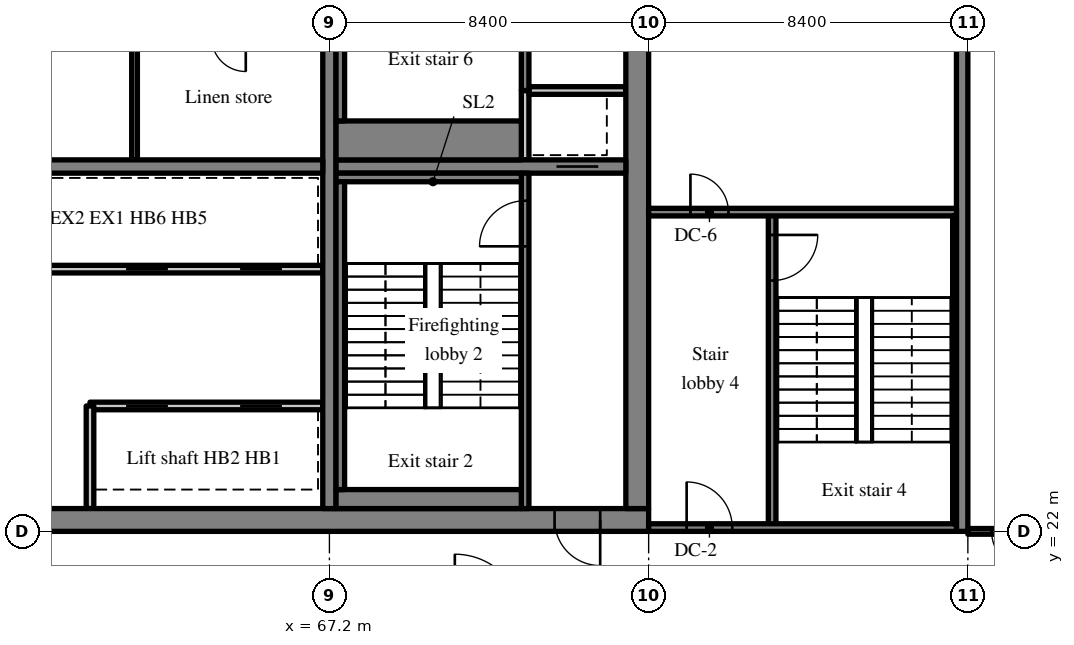
"""IFC4 building model, lengths in metres.
Left out: names, types, materials, properties, quantities, classifications, styles, units other than length and angle.
Written with IfcOpenShell. Run it as: python <this file> out.ifc"""

import sys

from ifc_helpers import new_model, si_unit, direction, frame, frame_2d, origin, place, context, subcontext, project, spatial, rectangle, extrude, source, transform, mapped, element, fill, save


model = new_model("IFC4")
c1 = context("Model", 3, precision=1e-05, world=origin(), true_north=direction((0.0, 1.0)))
c2 = subcontext(c1, "Body", "Model", "MODEL_VIEW")
j1 = project(units=[si_unit("LENGTHUNIT", "METRE"), si_unit("PLANEANGLEUNIT", "RADIAN")], contexts=[c1])
p1 = place(None, origin())
s1 = spatial("IfcSite", under=j1, at=p1, CompositionType="ELEMENT")
p2 = place(p1, origin())
s2 = spatial("IfcBuilding", under=s1, at=p2, CompositionType="ELEMENT")
p3 = place(p2, frame((0.0, 0.0, 241.3)))
s3 = spatial("IfcBuildingStorey", under=s2, at=p3, CompositionType="ELEMENT", Elevation=241.3)
m1 = source(origin(), c2, "Body", "SweptSolid", [
    extrude(rectangle(XDim=50.4, YDim=0.6, at=frame_2d((25.2, 0.0))), origin(), (0.0, 0.0, 1.0), 3.62),
])
p4 = place(p3, frame((25.2, 22.3, 0.0), z_axis=(0.0, 0.0, 1.0), x_axis=(1.0, 0.0, 0.0)))
e1 = element("IfcWall", 1, at=p4, inside=s3, PredefinedType="SHEAR", context=c2, shape_type="MappedRepresentation", body=[
    mapped(m1, transform((0.0, 0.0, 0.0), scale=1.0)),
])
m2 = source(origin(), c2, "Body", "SweptSolid", [
    extrude(rectangle(XDim=1.8, YDim=2.1, at=frame_2d((0.9, 1.05))), frame((0.0, 0.31, 0.0), z_axis=(0.0, -1.0, 0.0), x_axis=(1.0, 0.0, 0.0)), (0.0, 0.0, 1.0), 0.62),
])
p5 = place(p4, frame((15.9, 0.0, 0.0)))
e2 = element("IfcOpeningElement", 2, at=p5, cuts=e1, PredefinedType="OPENING", context=c2, shape_type="MappedRepresentation", body=[
    mapped(m2, transform((0.0, 0.0, 0.0), scale=1.0)),
])
m3 = source(origin(), c2, "Body", "SweptSolid", [
    extrude(rectangle(XDim=0.9, YDim=2.1, at=frame_2d((0.45, 1.05))), frame((0.0, 0.31, 0.0), z_axis=(0.0, -1.0, 0.0), x_axis=(1.0, 0.0, 0.0)), (0.0, 0.0, 1.0), 0.62),
])
p6 = place(p4, frame((9.687, 0.0, 0.0)))
e3 = element("IfcOpeningElement", 3, at=p6, cuts=e1, PredefinedType="OPENING", context=c2, shape_type="MappedRepresentation", body=[
    mapped(m3, transform((0.0, 0.0, 0.0), scale=1.0)),
])
p7 = place(p4, frame((21.513, 0.0, 0.0)))
e4 = element("IfcOpeningElement", 4, at=p7, cuts=e1, PredefinedType="OPENING", context=c2, shape_type="MappedRepresentation", body=[
    mapped(m3, transform((0.0, 0.0, 0.0), scale=1.0)),
])
p8 = place(p4, frame((32.7, 0.0, 0.0)))
e5 = element("IfcOpeningElement", 5, at=p8, cuts=e1, PredefinedType="OPENING", context=c2, shape_type="MappedRepresentation", body=[
    mapped(m2, transform((0.0, 0.0, 0.0), scale=1.0)),
])
m4 = source(origin(), c2, "Body", "SweptSolid", [
    extrude(rectangle(XDim=1.2, YDim=2.1, at=frame_2d((0.6, 1.05))), frame((0.0, 0.31, 0.0), z_axis=(0.0, -1.0, 0.0), x_axis=(1.0, 0.0, 0.0)), (0.0, 0.0, 1.0), 0.62),
])
p9 = place(p4, frame((6.488, 0.0, 0.0)))
e6 = element("IfcOpeningElement", 6, at=p9, cuts=e1, PredefinedType="OPENING", context=c2, shape_type="MappedRepresentation", body=[
    mapped(m4, transform((0.0, 0.0, 0.0), scale=1.0)),
])
p10 = place(p4, frame((47.925, 0.0, 0.0)))
e7 = element("IfcOpeningElement", 7, at=p10, cuts=e1, PredefinedType="OPENING", context=c2, shape_type="MappedRepresentation", body=[
    mapped(m4, transform((0.0, 0.0, 0.0), scale=1.0)),
])
m5 = source(origin(), c2, "Body", "SweptSolid", [
    extrude(rectangle(XDim=18.8, YDim=0.6, at=frame_2d((9.4, 0.0))), origin(), (0.0, 0.0, 1.0), 3.62),
])
p11 = place(p3, frame((75.3, 22.6, 0.0), z_axis=(0.0, 0.0, 1.0), x_axis=(0.0, 1.0, 0.0)))
e8 = element("IfcWall", 8, at=p11, inside=s3, PredefinedType="SHEAR", context=c2, shape_type="MappedRepresentation", body=[
    mapped(m5, transform((0.0, 0.0, 0.0), scale=1.0)),
])
p12 = place(p11, frame((12.8, 0.0, 0.0)))
e9 = element("IfcOpeningElement", 9, at=p12, cuts=e8, PredefinedType="OPENING", context=c2, shape_type="MappedRepresentation", body=[
    mapped(m4, transform((0.0, 0.0, 0.0), scale=1.0)),
])
m6 = source(origin(), c2, "Body", "SweptSolid", [
    extrude(rectangle(XDim=18.8, YDim=0.35, at=frame_2d((9.4, 0.0))), origin(), (0.0, 0.0, 1.0), 3.62),
])
p13 = place(p3, frame((67.2, 22.6, 0.0), z_axis=(0.0, 0.0, 1.0), x_axis=(0.0, 1.0, 0.0)))
e10 = element("IfcWall", 10, at=p13, inside=s3, PredefinedType="SHEAR", context=c2, shape_type="MappedRepresentation", body=[
    mapped(m6, transform((0.0, 0.0, 0.0), scale=1.0)),
])
m7 = source(origin(), c2, "Body", "SweptSolid", [
    extrude(rectangle(XDim=16.45, YDim=0.35, at=frame_2d((8.225, 0.0))), origin(), (0.0, 0.0, 1.0), 3.62),
])
p14 = place(p3, frame((50.575, 31.6, 0.0), z_axis=(0.0, 0.0, 1.0), x_axis=(1.0, 0.0, 0.0)))
e11 = element("IfcWall", 11, at=p14, inside=s3, PredefinedType="SHEAR", context=c2, shape_type="MappedRepresentation", body=[
    mapped(m7, transform((0.0, 0.0, 0.0), scale=1.0)),
])
m8 = source(origin(), c2, "Body", "SweptSolid", [
    extrude(rectangle(XDim=1.0, YDim=2.1, at=frame_2d((0.5, 1.05))), frame((0.0, 0.185, 0.0), z_axis=(0.0, -1.0, 0.0), x_axis=(1.0, 0.0, 0.0)), (0.0, 0.0, 1.0), 0.37),
])
p15 = place(p14, frame((0.613, 0.0, 0.0)))
e12 = element("IfcOpeningElement", 12, at=p15, cuts=e11, PredefinedType="OPENING", context=c2, shape_type="MappedRepresentation", body=[
    mapped(m8, transform((0.0, 0.0, 0.0), scale=1.0)),
])
m9 = source(origin(), c2, "Body", "SweptSolid", [
    extrude(rectangle(XDim=7.625, YDim=0.35, at=frame_2d((3.812, 0.0))), origin(), (0.0, 0.0, 1.0), 3.62),
])
p16 = place(p3, frame((67.375, 31.6, 0.0), z_axis=(0.0, 0.0, 1.0), x_axis=(1.0, 0.0, 0.0)))
e13 = element("IfcWall", 13, at=p16, inside=s3, PredefinedType="SHEAR", context=c2, shape_type="MappedRepresentation", body=[
    mapped(m9, transform((0.0, 0.0, 0.0), scale=1.0)),
])
m10 = source(origin(), c2, "Body", "SweptSolid", [
    extrude(rectangle(XDim=1.1, YDim=2.1, at=frame_2d((0.55, 1.05))), frame((0.0, 0.185, 0.0), z_axis=(0.0, -1.0, 0.0), x_axis=(1.0, 0.0, 0.0)), (0.0, 0.0, 1.0), 0.37),
])
p17 = place(p16, frame((5.8, 0.0, 0.0)))
e14 = element("IfcOpeningElement", 14, at=p17, cuts=e13, PredefinedType="OPENING", context=c2, shape_type="MappedRepresentation", body=[
    mapped(m10, transform((0.0, 0.0, 0.0), scale=1.0)),
])
m11 = source(origin(), c2, "Body", "SweptSolid", [
    extrude(rectangle(XDim=18.4, YDim=0.3, at=frame_2d((9.2, 0.0))), origin(), (0.0, 0.0, 1.0), 3.62),
])
p18 = place(p3, frame((83.85, 22.0, 0.0), z_axis=(0.0, 0.0, 1.0), x_axis=(0.0, 1.0, 0.0)))
e15 = element("IfcWall", 15, at=p18, inside=s3, PredefinedType="SHEAR", context=c2, shape_type="MappedRepresentation", body=[
    mapped(m11, transform((0.0, 0.0, 0.0), scale=1.0)),
])
m12 = source(origin(), c2, "Body", "SweptSolid", [
    extrude(rectangle(XDim=6.125, YDim=0.2, at=frame_2d((3.062, 0.0))), origin(), (0.0, 0.0, 1.0), 3.62),
])
p19 = place(p3, frame((67.025, 25.3, 0.0), z_axis=(0.0, 0.0, 1.0), x_axis=(-1.0, 0.0, 0.0)))
e16 = element("IfcWall", 16, at=p19, inside=s3, PredefinedType="SOLIDWALL", context=c2, shape_type="MappedRepresentation", body=[
    mapped(m12, transform((0.0, 0.0, 0.0), scale=1.0)),
])
m13 = source(origin(), c2, "Body", "SweptSolid", [
    extrude(rectangle(XDim=1.1, YDim=2.1, at=frame_2d((0.55, 1.05))), frame((0.0, 0.11, 0.0), z_axis=(0.0, -1.0, 0.0), x_axis=(1.0, 0.0, 0.0)), (0.0, 0.0, 1.0), 0.22),
])
p20 = place(p19, frame((1.075, 0.0, 0.0)))
e17 = element("IfcOpeningElement", 17, at=p20, cuts=e16, PredefinedType="OPENING", context=c2, shape_type="MappedRepresentation", body=[
    mapped(m13, transform((0.0, 0.0, 0.0), scale=1.0)),
])
p21 = place(p19, frame((4.075, 0.0, 0.0)))
e18 = element("IfcOpeningElement", 18, at=p21, cuts=e16, PredefinedType="OPENING", context=c2, shape_type="MappedRepresentation", body=[
    mapped(m13, transform((0.0, 0.0, 0.0), scale=1.0)),
])
m14 = source(origin(), c2, "Body", "SweptSolid", [
    extrude(rectangle(XDim=12.125, YDim=0.2, at=frame_2d((6.062, 0.0))), origin(), (0.0, 0.0, 1.0), 3.62),
])
p22 = place(p3, frame((67.025, 28.9, 0.0), z_axis=(0.0, 0.0, 1.0), x_axis=(-1.0, 0.0, 0.0)))
e19 = element("IfcWall", 19, at=p22, inside=s3, PredefinedType="SOLIDWALL", context=c2, shape_type="MappedRepresentation", body=[
    mapped(m14, transform((0.0, 0.0, 0.0), scale=1.0)),
])
p23 = place(p22, frame((1.075, 0.0, 0.0)))
e20 = element("IfcOpeningElement", 20, at=p23, cuts=e19, PredefinedType="OPENING", context=c2, shape_type="MappedRepresentation", body=[
    mapped(m13, transform((0.0, 0.0, 0.0), scale=1.0)),
])
p24 = place(p22, frame((4.075, 0.0, 0.0)))
e21 = element("IfcOpeningElement", 21, at=p24, cuts=e19, PredefinedType="OPENING", context=c2, shape_type="MappedRepresentation", body=[
    mapped(m13, transform((0.0, 0.0, 0.0), scale=1.0)),
])
m15 = source(origin(), c2, "Body", "SweptSolid", [
    extrude(rectangle(XDim=2.7, YDim=0.2, at=frame_2d((1.35, 0.0))), origin(), (0.0, 0.0, 1.0), 3.62),
])
p25 = place(p3, frame((60.9, 22.6, 0.0), z_axis=(0.0, 0.0, 1.0), x_axis=(0.0, 1.0, 0.0)))
e22 = element("IfcWall", 22, at=p25, inside=s3, PredefinedType="SOLIDWALL", context=c2, shape_type="MappedRepresentation", body=[
    mapped(m15, transform((0.0, 0.0, 0.0), scale=1.0)),
])
m16 = source(origin(), c2, "Body", "SweptSolid", [
    extrude(rectangle(XDim=3.225, YDim=0.15, at=frame_2d((1.613, 0.0))), origin(), (0.0, 0.0, 1.0), 3.62),
])
p26 = place(p3, frame((62.072, 31.775, 0.0), z_axis=(0.0, 0.0, 1.0), x_axis=(0.0, 1.0, 0.0)))
e23 = element("IfcWall", 23, at=p26, inside=s3, PredefinedType="PARTITIONING", context=c2, shape_type="MappedRepresentation", body=[
    mapped(m16, transform((0.0, 0.0, 0.0), scale=1.0)),
])
m17 = source(origin(), c2, "Body", "SweptSolid", [
    extrude(rectangle(XDim=8.825, YDim=0.2, at=frame_2d((4.413, 0.0))), origin(), (0.0, 0.0, 1.0), 3.62),
])
p27 = place(p3, frame((72.35, 22.6, 0.0), z_axis=(0.0, 0.0, 1.0), x_axis=(0.0, 1.0, 0.0)))
e24 = element("IfcWall", 24, at=p27, inside=s3, PredefinedType="SOLIDWALL", context=c2, shape_type="MappedRepresentation", body=[
    mapped(m17, transform((0.0, 0.0, 0.0), scale=1.0)),
])
m18 = source(origin(), c2, "Body", "SweptSolid", [
    extrude(rectangle(XDim=1.2, YDim=2.1, at=frame_2d((0.6, 1.05))), frame((0.0, 0.11, 0.0), z_axis=(0.0, -1.0, 0.0), x_axis=(1.0, 0.0, 0.0)), (0.0, 0.0, 1.0), 0.22),
])
p28 = place(p27, frame((6.9, 0.0, 0.0)))
e25 = element("IfcOpeningElement", 25, at=p28, cuts=e24, PredefinedType="OPENING", context=c2, shape_type="MappedRepresentation", body=[
    mapped(m18, transform((0.0, 0.0, 0.0), scale=1.0)),
])
m19 = source(origin(), c2, "Body", "SweptSolid", [
    extrude(rectangle(XDim=1.825, YDim=0.2, at=frame_2d((0.913, 0.0))), origin(), (0.0, 0.0, 1.0), 3.62),
])
p29 = place(p3, frame((72.35, 31.775, 0.0), z_axis=(0.0, 0.0, 1.0), x_axis=(0.0, 1.0, 0.0)))
e26 = element("IfcWall", 26, at=p29, inside=s3, PredefinedType="SOLIDWALL", context=c2, shape_type="MappedRepresentation", body=[
    mapped(m19, transform((0.0, 0.0, 0.0), scale=1.0)),
])
m20 = source(origin(), c2, "Body", "SweptSolid", [
    extrude(rectangle(XDim=2.55, YDim=0.2, at=frame_2d((1.275, 0.0))), origin(), (0.0, 0.0, 1.0), 3.62),
])
p30 = place(p3, frame((72.45, 33.6, 0.0), z_axis=(0.0, 0.0, 1.0), x_axis=(1.0, 0.0, 0.0)))
e27 = element("IfcWall", 27, at=p30, inside=s3, PredefinedType="SOLIDWALL", context=c2, shape_type="MappedRepresentation", body=[
    mapped(m20, transform((0.0, 0.0, 0.0), scale=1.0)),
])
m21 = source(origin(), c2, "Body", "SweptSolid", [
    extrude(rectangle(XDim=7.8, YDim=0.2, at=frame_2d((3.9, 0.0))), origin(), (0.0, 0.0, 1.0), 3.62),
])
p31 = place(p3, frame((72.35, 33.6, 0.0), z_axis=(0.0, 0.0, 1.0), x_axis=(0.0, 1.0, 0.0)))
e28 = element("IfcWall", 28, at=p31, inside=s3, PredefinedType="SOLIDWALL", context=c2, shape_type="MappedRepresentation", body=[
    mapped(m21, transform((0.0, 0.0, 0.0), scale=1.0)),
])
m22 = source(origin(), c2, "Body", "SweptSolid", [
    extrude(rectangle(XDim=1.8, YDim=2.1, at=frame_2d((0.9, 1.05))), frame((0.0, 0.11, 0.0), z_axis=(0.0, -1.0, 0.0), x_axis=(1.0, 0.0, 0.0)), (0.0, 0.0, 1.0), 0.22),
])
p32 = place(p31, frame((5.3, 0.0, 0.0)))
e29 = element("IfcOpeningElement", 29, at=p32, cuts=e28, PredefinedType="OPENING", context=c2, shape_type="MappedRepresentation", body=[
    mapped(m22, transform((0.0, 0.0, 0.0), scale=1.0)),
])
m23 = source(origin(), c2, "Body", "SweptSolid", [
    extrude(rectangle(XDim=8.3, YDim=0.2, at=frame_2d((4.15, 0.0))), origin(), (0.0, 0.0, 1.0), 3.62),
])
p33 = place(p3, frame((78.85, 22.1, 0.0), z_axis=(0.0, 0.0, 1.0), x_axis=(0.0, 1.0, 0.0)))
e30 = element("IfcWall", 30, at=p33, inside=s3, PredefinedType="SOLIDWALL", context=c2, shape_type="MappedRepresentation", body=[
    mapped(m23, transform((0.0, 0.0, 0.0), scale=1.0)),
])
p34 = place(p33, frame((6.5, 0.0, 0.0)))
e31 = element("IfcOpeningElement", 31, at=p34, cuts=e30, PredefinedType="OPENING", context=c2, shape_type="MappedRepresentation", body=[
    mapped(m18, transform((0.0, 0.0, 0.0), scale=1.0)),
])
m24 = source(origin(), c2, "Body", "SweptSolid", [
    extrude(rectangle(XDim=8.1, YDim=0.2, at=frame_2d((4.05, 0.0))), origin(), (0.0, 0.0, 1.0), 3.62),
])
p35 = place(p3, frame((83.7, 22.1, 0.0), z_axis=(0.0, 0.0, 1.0), x_axis=(-1.0, 0.0, 0.0)))
e32 = element("IfcWall", 32, at=p35, inside=s3, PredefinedType="SOLIDWALL", context=c2, shape_type="MappedRepresentation", body=[
    mapped(m24, transform((0.0, 0.0, 0.0), scale=1.0)),
])
p36 = place(p35, frame((5.9, 0.0, 0.0)))
e33 = element("IfcOpeningElement", 33, at=p36, cuts=e32, PredefinedType="OPENING", context=c2, shape_type="MappedRepresentation", body=[
    mapped(m18, transform((0.0, 0.0, 0.0), scale=1.0)),
])
p37 = place(p3, frame((83.7, 30.4, 0.0), z_axis=(0.0, 0.0, 1.0), x_axis=(-1.0, 0.0, 0.0)))
e34 = element("IfcWall", 34, at=p37, inside=s3, PredefinedType="SOLIDWALL", context=c2, shape_type="MappedRepresentation", body=[
    mapped(m24, transform((0.0, 0.0, 0.0), scale=1.0)),
])
m25 = source(origin(), c2, "Body", "SweptSolid", [
    extrude(rectangle(XDim=1.0, YDim=2.1, at=frame_2d((0.5, 1.05))), frame((0.0, 0.11, 0.0), z_axis=(0.0, -1.0, 0.0), x_axis=(1.0, 0.0, 0.0)), (0.0, 0.0, 1.0), 0.22),
])
p38 = place(p37, frame((6.0, 0.0, 0.0)))
e35 = element("IfcOpeningElement", 35, at=p38, cuts=e34, PredefinedType="OPENING", context=c2, shape_type="MappedRepresentation", body=[
    mapped(m25, transform((0.0, 0.0, 0.0), scale=1.0)),
])
m26 = source(origin(), c2, "Body", "SweptSolid", [
    extrude(rectangle(XDim=4.875, YDim=0.5, at=frame_2d((2.438, 0.0))), origin(), (0.0, 0.0, 1.0), 3.62),
])
p39 = place(p3, frame((67.375, 22.85, 0.0), z_axis=(0.0, 0.0, 1.0), x_axis=(1.0, 0.0, 0.0)))
e36 = element("IfcWall", 36, at=p39, inside=s3, PredefinedType="SOLIDWALL", context=c2, shape_type="MappedRepresentation", body=[
    mapped(m26, transform((0.0, 0.0, 0.0), scale=1.0)),
])
m27 = source(origin(), c2, "Body", "SweptSolid", [
    extrude(rectangle(XDim=4.875, YDim=0.225, at=frame_2d((2.438, 0.0))), origin(), (0.0, 0.0, 1.0), 3.62),
])
p40 = place(p3, frame((67.375, 31.312, 0.0), z_axis=(0.0, 0.0, 1.0), x_axis=(1.0, 0.0, 0.0)))
e37 = element("IfcWall", 37, at=p40, inside=s3, PredefinedType="SOLIDWALL", context=c2, shape_type="MappedRepresentation", body=[
    mapped(m27, transform((0.0, 0.0, 0.0), scale=1.0)),
])
m28 = source(origin(), c2, "Body", "SweptSolid", [
    extrude(rectangle(XDim=8.1, YDim=0.225, at=frame_2d((4.05, 0.0))), origin(), (0.0, 0.0, 1.0), 3.62),
])
p41 = place(p3, frame((67.487, 23.1, 0.0), z_axis=(0.0, 0.0, 1.0), x_axis=(0.0, 1.0, 0.0)))
e38 = element("IfcWall", 38, at=p41, inside=s3, PredefinedType="SOLIDWALL", context=c2, shape_type="MappedRepresentation", body=[
    mapped(m28, transform((0.0, 0.0, 0.0), scale=1.0)),
])
m29 = source(origin(), c2, "Body", "SweptSolid", [
    extrude(rectangle(XDim=4.875, YDim=1.025, at=frame_2d((2.438, 0.0))), origin(), (0.0, 0.0, 1.0), 3.62),
])
p42 = place(p3, frame((67.375, 32.287, 0.0), z_axis=(0.0, 0.0, 1.0), x_axis=(1.0, 0.0, 0.0)))
e39 = element("IfcWall", 39, at=p42, inside=s3, PredefinedType="SOLIDWALL", context=c2, shape_type="MappedRepresentation", body=[
    mapped(m29, transform((0.0, 0.0, 0.0), scale=1.0)),
])
p43 = place(p3, frame((67.487, 32.8, 0.0), z_axis=(0.0, 0.0, 1.0), x_axis=(0.0, 1.0, 0.0)))
e40 = element("IfcWall", 40, at=p43, inside=s3, PredefinedType="SOLIDWALL", context=c2, shape_type="MappedRepresentation", body=[
    mapped(m28, transform((0.0, 0.0, 0.0), scale=1.0)),
])
m30 = source(origin(), c2, "Body", "SweptSolid", [
    extrude(rectangle(XDim=8.1, YDim=0.1, at=frame_2d((4.05, 0.0))), origin(), (0.0, 0.0, 1.0), 3.62),
])
p44 = place(p3, frame((83.65, 22.2, 0.0), z_axis=(0.0, 0.0, 1.0), x_axis=(0.0, 1.0, 0.0)))
e41 = element("IfcWall", 41, at=p44, inside=s3, PredefinedType="SOLIDWALL", context=c2, shape_type="MappedRepresentation", body=[
    mapped(m30, transform((0.0, 0.0, 0.0), scale=1.0)),
])
m31 = source(origin(), c2, "Body", "SweptSolid", [
    extrude(rectangle(XDim=1.9, YDim=0.15, at=frame_2d((0.95, 0.0))), origin(), (0.0, 0.0, 1.0), 2.92),
])
p45 = place(p3, frame((84.0, 22.0, 0.0), z_axis=(0.0, 0.0, 1.0), x_axis=(1.0, 0.0, 0.0)))
e42 = element("IfcWall", 42, at=p45, inside=s3, PredefinedType="PARTITIONING", context=c2, shape_type="MappedRepresentation", body=[
    mapped(m31, transform((0.0, 0.0, 0.0), scale=1.0)),
])
m32 = source(origin(), c2, "Body", "SweptSolid", [
    extrude(rectangle(XDim=1.0, YDim=2.1, at=frame_2d((0.5, 1.05))), frame((0.0, 0.085, 0.0), z_axis=(0.0, -1.0, 0.0), x_axis=(1.0, 0.0, 0.0)), (0.0, 0.0, 1.0), 0.17),
])
p46 = place(p45, frame((0.625, 0.0, 0.0)))
e43 = element("IfcOpeningElement", 43, at=p46, cuts=e42, PredefinedType="OPENING", context=c2, shape_type="MappedRepresentation", body=[
    mapped(m32, transform((0.0, 0.0, 0.0), scale=1.0)),
])
m33 = source(origin(), c2, "Body", "SweptSolid", [
    extrude(rectangle(XDim=1.1, YDim=2.1, at=frame_2d((0.55, 1.05))), frame((0.0, 0.025, 0.0), z_axis=(0.0, -1.0, 0.0), x_axis=(1.0, 0.0, 0.0)), (0.0, 0.0, 1.0), 0.05),
])
p47 = place(p20, origin())
e44 = element("IfcDoor", 44, at=p47, inside=s3, OperationType="SLIDING_TO_RIGHT", PredefinedType="DOOR", context=c2, shape_type="MappedRepresentation", body=[
    mapped(m33, transform((0.0, 0.0, 0.0), scale=1.0)),
])
fill(e17, e44)
p48 = place(p21, origin())
e45 = element("IfcDoor", 45, at=p48, inside=s3, OperationType="SLIDING_TO_LEFT", PredefinedType="DOOR", context=c2, shape_type="MappedRepresentation", body=[
    mapped(m33, transform((0.0, 0.0, 0.0), scale=1.0)),
])
fill(e18, e45)
p49 = place(p23, origin())
e46 = element("IfcDoor", 46, at=p49, inside=s3, OperationType="SLIDING_TO_RIGHT", PredefinedType="DOOR", context=c2, shape_type="MappedRepresentation", body=[
    mapped(m33, transform((0.0, 0.0, 0.0), scale=1.0)),
])
fill(e20, e46)
p50 = place(p24, origin())
e47 = element("IfcDoor", 47, at=p50, inside=s3, OperationType="SLIDING_TO_LEFT", PredefinedType="DOOR", context=c2, shape_type="MappedRepresentation", body=[
    mapped(m33, transform((0.0, 0.0, 0.0), scale=1.0)),
])
fill(e21, e47)
m34 = source(origin(), c2, "Body", "SweptSolid", [
    extrude(rectangle(XDim=1.2, YDim=2.1, at=frame_2d((0.6, 1.05))), frame((0.0, 0.025, 0.0), z_axis=(0.0, -1.0, 0.0), x_axis=(1.0, 0.0, 0.0)), (0.0, 0.0, 1.0), 0.05),
])
p51 = place(p28, origin())
e48 = element("IfcDoor", 48, at=p51, inside=s3, OperationType="SINGLE_SWING_LEFT", PredefinedType="DOOR", context=c2, shape_type="MappedRepresentation", body=[
    mapped(m34, transform((0.0, 0.0, 0.0), scale=1.0)),
])
fill(e25, e48)
m35 = source(origin(), c2, "Body", "SweptSolid", [
    extrude(rectangle(XDim=1.2, YDim=2.1, at=frame_2d((0.6, 1.05))), frame((0.0, 0.225, 0.0), z_axis=(0.0, -1.0, 0.0), x_axis=(1.0, 0.0, 0.0)), (0.0, 0.0, 1.0), 0.05),
])
p52 = place(p10, origin())
e49 = element("IfcDoor", 49, at=p52, inside=s3, OperationType="SINGLE_SWING_RIGHT", PredefinedType="DOOR", context=c2, shape_type="MappedRepresentation", body=[
    mapped(m35, transform((0.0, 0.0, 0.0), scale=1.0)),
])
fill(e7, e49)
p53 = place(p17, origin())
e50 = element("IfcDoor", 50, at=p53, inside=s3, OperationType="SLIDING_TO_RIGHT", PredefinedType="DOOR", context=c2, shape_type="MappedRepresentation", body=[
    mapped(m33, transform((0.0, 0.0, 0.0), scale=1.0)),
])
fill(e14, e50)
p54 = place(p34, origin())
e51 = element("IfcDoor", 51, at=p54, inside=s3, OperationType="SINGLE_SWING_RIGHT", PredefinedType="DOOR", context=c2, shape_type="MappedRepresentation", body=[
    mapped(m34, transform((0.0, 0.0, 0.0), scale=1.0)),
])
fill(e31, e51)
p55 = place(p36, origin())
e52 = element("IfcDoor", 52, at=p55, inside=s3, OperationType="SINGLE_SWING_RIGHT", PredefinedType="DOOR", context=c2, shape_type="MappedRepresentation", body=[
    mapped(m34, transform((0.0, 0.0, 0.0), scale=1.0)),
])
fill(e33, e52)
m36 = source(origin(), c2, "Body", "SweptSolid", [
    extrude(rectangle(XDim=1.0, YDim=2.1, at=frame_2d((0.5, 1.05))), frame((0.0, 0.025, 0.0), z_axis=(0.0, -1.0, 0.0), x_axis=(1.0, 0.0, 0.0)), (0.0, 0.0, 1.0), 0.05),
])
p56 = place(p38, origin())
e53 = element("IfcDoor", 53, at=p56, inside=s3, OperationType="SINGLE_SWING_RIGHT", PredefinedType="DOOR", context=c2, shape_type="MappedRepresentation", body=[
    mapped(m36, transform((0.0, 0.0, 0.0), scale=1.0)),
])
fill(e35, e53)
p57 = place(p46, origin())
e54 = element("IfcDoor", 54, at=p57, inside=s3, OperationType="SINGLE_SWING_RIGHT", PredefinedType="DOOR", context=c2, shape_type="MappedRepresentation", body=[
    mapped(m36, transform((0.0, 0.0, 0.0), scale=1.0)),
])
fill(e43, e54)
save(model, sys.argv[1])
